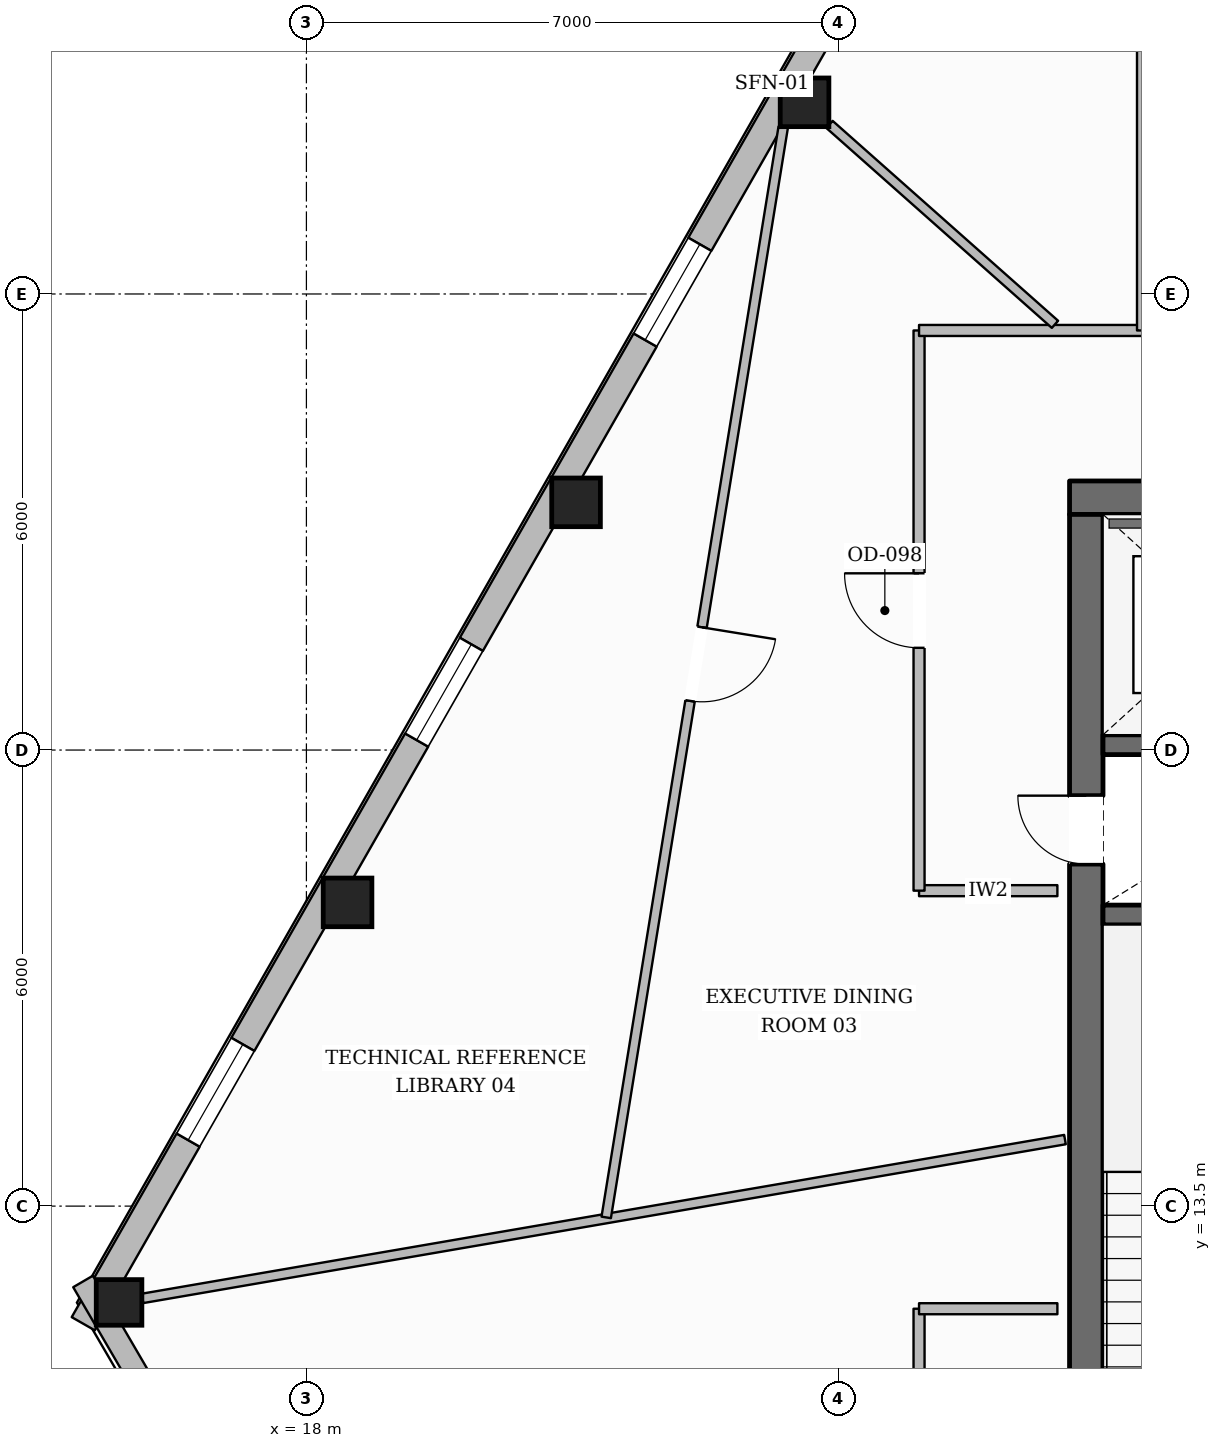
"""IFC4 building model, lengths in metres.
Left out: names, types, materials, properties, quantities, classifications, styles, units other than length and angle.
Written with IfcOpenShell. Run it as: python <this file> out.ifc"""

import sys

from ifc_helpers import new_model, si_unit, direction, frame, frame_2d, origin, origin_2d, place, context, subcontext, project, spatial, rectangle, hollow_rectangle, extrude, element, fill, save


model = new_model("IFC4")
c1 = context("Model", 3, precision=1e-05, world=origin(), true_north=direction((0.0, 1.0)))
c2 = subcontext(c1, "Body", "Model", "MODEL_VIEW")
j1 = project(units=[si_unit("LENGTHUNIT", "METRE"), si_unit("PLANEANGLEUNIT", "RADIAN")], contexts=[c1])
p1 = place(None, origin())
s1 = spatial("IfcSite", under=j1, at=p1, CompositionType="ELEMENT")
p2 = place(p1, origin())
s2 = spatial("IfcBuilding", under=s1, at=p2, CompositionType="ELEMENT")
p3 = place(p2, frame((0.0, 0.0, 184.25)))
s3 = spatial("IfcBuildingStorey", under=s2, at=p3, CompositionType="ELEMENT", Elevation=184.25)
p4 = place(p3, frame((28.04, 22.82, 0.0), z_axis=(0.0, 0.0, 1.0), x_axis=(1.0, 0.0, 0.0)))
e1 = element("IfcWall", 1, at=p4, inside=s3, PredefinedType="SOLIDWALL", context=c2, shape_type="SweptSolid", body=[
    extrude(rectangle(XDim=19.92, YDim=0.44, at=frame_2d((9.96, 0.0))), origin(), (0.0, 0.0, 1.0), 3.6),
])
p5 = place(p4, frame((6.235, 0.0, 0.0)))
e2 = element("IfcOpeningElement", 2, at=p5, cuts=e1, PredefinedType="OPENING", context=c2, shape_type="SweptSolid", body=[
    extrude(rectangle(XDim=1.05, YDim=2.15, at=frame_2d((0.525, 1.075))), frame((0.0, 0.23, 0.0), z_axis=(0.0, -1.0, 0.0), x_axis=(1.0, 0.0, 0.0)), (0.0, 0.0, 1.0), 0.46),
])
p6 = place(p4, frame((12.635, 0.0, 0.0)))
e3 = element("IfcOpeningElement", 3, at=p6, cuts=e1, PredefinedType="OPENING", context=c2, shape_type="SweptSolid", body=[
    extrude(rectangle(XDim=1.05, YDim=2.15, at=frame_2d((0.525, 1.075))), frame((0.0, 0.23, 0.0), z_axis=(0.0, -1.0, 0.0), x_axis=(1.0, 0.0, 0.0)), (0.0, 0.0, 1.0), 0.46),
])
p7 = place(p3, frame((28.26, 9.6, 0.0), z_axis=(0.0, 0.0, 1.0), x_axis=(0.0, 1.0, 0.0)))
e4 = element("IfcWall", 4, at=p7, inside=s3, PredefinedType="SOLIDWALL", context=c2, shape_type="SweptSolid", body=[
    extrude(rectangle(XDim=13.0, YDim=0.44, at=frame_2d((6.5, 0.0))), origin(), (0.0, 0.0, 1.0), 3.6),
])
p8 = place(p7, frame((0.2, 0.0, 0.0)))
e5 = element("IfcOpeningElement", 5, at=p8, cuts=e4, PredefinedType="OPENING", context=c2, shape_type="SweptSolid", body=[
    extrude(rectangle(XDim=1.1, YDim=2.15, at=frame_2d((0.55, 1.075))), frame((0.0, 0.23, 0.0), z_axis=(0.0, -1.0, 0.0), x_axis=(1.0, 0.0, 0.0)), (0.0, 0.0, 1.0), 0.46),
])
p9 = place(p7, frame((8.4, 0.0, 0.0)))
e6 = element("IfcOpeningElement", 6, at=p9, cuts=e4, PredefinedType="OPENING", context=c2, shape_type="SweptSolid", body=[
    extrude(rectangle(XDim=0.9, YDim=2.1, at=frame_2d((0.45, 1.05))), frame((0.0, 0.23, 0.0), z_axis=(0.0, -1.0, 0.0), x_axis=(1.0, 0.0, 0.0)), (0.0, 0.0, 1.0), 0.46),
])
for number, where, z_axis, x_axis in (
    (7, (28.48, 17.33, 0.0), (0.0, 0.0, 1.0), (1.0, 0.0, 0.0)),
    (8, (28.48, 19.57, 0.0), (0.0, 0.0, 1.0), (1.0, 0.0, 0.0)),
):
    element("IfcWall", number, at=place(p3, frame(where, z_axis=z_axis, x_axis=x_axis)), inside=s3, PredefinedType="SHEAR", context=c2, shape_type="SweptSolid", body=[
        extrude(rectangle(XDim=3.2, YDim=0.26, at=frame_2d((1.6, 0.0))), origin(), (0.0, 0.0, 1.0), 3.6),
    ])
for number, where, z_axis, x_axis in (
    (9, (24.554, 28.021, 0.0), (0.0, 0.0, 1.0), (1.0, 0.0, 0.0)),
    (10, (21.548, 22.759, 0.0), (0.0, 0.0, 1.0), (1.0, 0.0, 0.0)),
    (11, (18.542, 17.496, 0.0), (0.0, 0.0, 1.0), (1.0, 0.0, 0.0)),
):
    element("IfcColumn", number, at=place(p3, frame(where, z_axis=z_axis, x_axis=x_axis)), inside=s3, PredefinedType="COLUMN", context=c2, shape_type="SweptSolid", body=[
        extrude(hollow_rectangle(XDim=0.64, YDim=0.64, WallThickness=0.028, at=origin_2d()), origin(), (0.0, 0.0, 1.0), 3.6),
    ])
p10 = place(p3, frame((15.535, 12.233, 0.0), z_axis=(0.0, 0.0, 1.0), x_axis=(1.0, 0.0, 0.0)))
e12 = element("IfcColumn", 12, at=p10, inside=s3, PredefinedType="COLUMN", context=c2, shape_type="SweptSolid", body=[
    extrude(hollow_rectangle(XDim=0.6, YDim=0.6, WallThickness=0.028, at=origin_2d()), origin(), (0.0, 0.0, 1.0), 3.6),
])
p11 = place(p3, frame((15.064, 11.953, 0.0), z_axis=(0.0, 0.0, 1.0), x_axis=(0.495993114815, 0.86832645362, 0.0)))
e13 = element("IfcWall", 13, at=p11, inside=s3, PredefinedType="STANDARD", context=c2, shape_type="SweptSolid", body=[
    extrude(rectangle(XDim=37.324, YDim=0.35, at=frame_2d((18.662, 0.0))), origin(), (0.0, 0.0, 1.0), 3.132),
])
p12 = place(p11, frame((33.087, 0.0, 0.65)))
e14 = element("IfcOpeningElement", 14, at=p12, cuts=e13, PredefinedType="OPENING", context=c2, shape_type="SweptSolid", body=[
    extrude(rectangle(XDim=1.45, YDim=1.75, at=frame_2d((0.725, 0.875))), frame((0.0, 0.185, 0.0), z_axis=(0.0, -1.0, 0.0), x_axis=(1.0, 0.0, 0.0)), (0.0, 0.0, 1.0), 0.37),
])
p13 = place(p11, frame((27.026, 0.0, 0.65)))
e15 = element("IfcOpeningElement", 15, at=p13, cuts=e13, PredefinedType="OPENING", context=c2, shape_type="SweptSolid", body=[
    extrude(rectangle(XDim=1.45, YDim=1.75, at=frame_2d((0.725, 0.875))), frame((0.0, 0.185, 0.0), z_axis=(0.0, -1.0, 0.0), x_axis=(1.0, 0.0, 0.0)), (0.0, 0.0, 1.0), 0.37),
])
p14 = place(p11, frame((14.904, 0.0, 0.65)))
e16 = element("IfcOpeningElement", 16, at=p14, cuts=e13, PredefinedType="OPENING", context=c2, shape_type="SweptSolid", body=[
    extrude(rectangle(XDim=1.45, YDim=1.75, at=frame_2d((0.725, 0.875))), frame((0.0, 0.185, 0.0), z_axis=(0.0, -1.0, 0.0), x_axis=(1.0, 0.0, 0.0)), (0.0, 0.0, 1.0), 0.37),
])
p15 = place(p11, frame((8.844, 0.0, 0.65)))
e17 = element("IfcOpeningElement", 17, at=p15, cuts=e13, PredefinedType="OPENING", context=c2, shape_type="SweptSolid", body=[
    extrude(rectangle(XDim=1.45, YDim=1.75, at=frame_2d((0.725, 0.875))), frame((0.0, 0.185, 0.0), z_axis=(0.0, -1.0, 0.0), x_axis=(1.0, 0.0, 0.0)), (0.0, 0.0, 1.0), 0.37),
])
p16 = place(p11, frame((2.782, 0.0, 0.65)))
e18 = element("IfcOpeningElement", 18, at=p16, cuts=e13, PredefinedType="OPENING", context=c2, shape_type="SweptSolid", body=[
    extrude(rectangle(XDim=1.45, YDim=1.75, at=frame_2d((0.725, 0.875))), frame((0.0, 0.185, 0.0), z_axis=(0.0, -1.0, 0.0), x_axis=(1.0, 0.0, 0.0)), (0.0, 0.0, 1.0), 0.37),
])
p17 = place(p3, frame((20.12, 3.839, 0.0), z_axis=(0.0, 0.0, 1.0), x_axis=(-0.503937564299, 0.863740083178, 0.0)))
e19 = element("IfcWall", 19, at=p17, inside=s3, PredefinedType="STANDARD", context=c2, shape_type="SweptSolid", body=[
    extrude(rectangle(XDim=10.038, YDim=0.3, at=frame_2d((5.019, 0.0))), origin(), (0.0, 0.0, 1.0), 3.132),
])
p18 = place(p17, frame((4.494, 0.0, 0.65)))
e20 = element("IfcOpeningElement", 20, at=p18, cuts=e19, PredefinedType="OPENING", context=c2, shape_type="SweptSolid", body=[
    extrude(rectangle(XDim=1.05, YDim=1.7, at=frame_2d((0.525, 0.85))), frame((0.0, 0.16, 0.0), z_axis=(0.0, -1.0, 0.0), x_axis=(1.0, 0.0, 0.0)), (0.0, 0.0, 1.0), 0.32),
])
p19 = place(p3, frame((27.88, 17.65, 0.0), z_axis=(0.0, 0.0, 1.0), x_axis=(-1.0, 0.0, 0.0)))
e21 = element("IfcWall", 21, at=p19, inside=s3, PredefinedType="PARTITIONING", context=c2, shape_type="SweptSolid", body=[
    extrude(rectangle(XDim=1.82, YDim=0.145, at=frame_2d((0.91, 0.0))), origin(), (0.0, 0.0, 1.0), 3.141),
])
p20 = place(p3, frame((26.06, 17.65, 0.0), z_axis=(0.0, 0.0, 1.0), x_axis=(0.0, 1.0, 0.0)))
e22 = element("IfcWall", 22, at=p20, inside=s3, PredefinedType="PARTITIONING", context=c2, shape_type="SweptSolid", body=[
    extrude(rectangle(XDim=7.37, YDim=0.145, at=frame_2d((3.685, 0.0))), origin(), (0.0, 0.0, 1.0), 3.339),
])
p21 = place(p20, frame((3.195, 0.0, 0.0)))
e23 = element("IfcOpeningElement", 23, at=p21, cuts=e22, PredefinedType="OPENING", context=c2, shape_type="SweptSolid", body=[
    extrude(rectangle(XDim=0.98, YDim=2.15, at=frame_2d((0.49, 1.075))), frame((0.0, 0.083, 0.0), z_axis=(0.0, -1.0, 0.0), x_axis=(1.0, 0.0, 0.0)), (0.0, 0.0, 1.0), 0.165),
])
p22 = place(p3, frame((26.06, 25.02, 0.0), z_axis=(0.0, 0.0, 1.0), x_axis=(1.0, 0.0, 0.0)))
e24 = element("IfcWall", 24, at=p22, inside=s3, PredefinedType="PARTITIONING", context=c2, shape_type="SweptSolid", body=[
    extrude(rectangle(XDim=2.94, YDim=0.145, at=frame_2d((1.47, 0.0))), origin(), (0.0, 0.0, 1.0), 3.6),
])
p23 = place(p3, frame((29.0, 25.02, 0.0), z_axis=(0.0, 0.0, 1.0), x_axis=(0.0, 1.0, 0.0)))
e25 = element("IfcWall", 25, at=p23, inside=s3, PredefinedType="PARTITIONING", context=c2, shape_type="SweptSolid", body=[
    extrude(rectangle(XDim=8.662, YDim=0.145, at=frame_2d((4.331, 0.0))), origin(), (0.0, 0.0, 1.0), 3.6),
])
p24 = place(p3, frame((26.06, 7.18, 0.0), z_axis=(0.0, 0.0, 1.0), x_axis=(0.0, 1.0, 0.0)))
e26 = element("IfcWall", 26, at=p24, inside=s3, PredefinedType="PARTITIONING", context=c2, shape_type="SweptSolid", body=[
    extrude(rectangle(XDim=4.97, YDim=0.145, at=frame_2d((2.485, 0.0))), origin(), (0.0, 0.0, 1.0), 3.6),
])
p25 = place(p24, frame((1.785, 0.0, 0.0)))
e27 = element("IfcOpeningElement", 27, at=p25, cuts=e26, PredefinedType="OPENING", context=c2, shape_type="SweptSolid", body=[
    extrude(rectangle(XDim=1.4, YDim=2.2, at=frame_2d((0.7, 1.1))), frame((0.0, 0.083, 0.0), z_axis=(0.0, -1.0, 0.0), x_axis=(1.0, 0.0, 0.0)), (0.0, 0.0, 1.0), 0.165),
])
p26 = place(p3, frame((26.06, 12.15, 0.0), z_axis=(0.0, 0.0, 1.0), x_axis=(1.0, 0.0, 0.0)))
e28 = element("IfcWall", 28, at=p26, inside=s3, PredefinedType="PARTITIONING", context=c2, shape_type="SweptSolid", body=[
    extrude(rectangle(XDim=1.82, YDim=0.145, at=frame_2d((0.91, 0.0))), origin(), (0.0, 0.0, 1.0), 3.141),
])
p27 = place(p3, frame((27.848, 25.101, 0.0), z_axis=(0.0, 0.0, 1.0), x_axis=(-0.748288582972, 0.66337334631, 0.0)))
e29 = element("IfcWall", 29, at=p27, inside=s3, PredefinedType="PARTITIONING", context=c2, shape_type="SweptSolid", body=[
    extrude(rectangle(XDim=3.965, YDim=0.125, at=frame_2d((1.982, 0.0))), origin(), (0.0, 0.0, 1.0), 3.141),
])
p28 = place(p3, frame((27.98, 14.375, 0.0), z_axis=(0.0, 0.0, 1.0), x_axis=(-0.9855033492, -0.169655971646, 0.0)))
e30 = element("IfcWall", 30, at=p28, inside=s3, PredefinedType="PARTITIONING", context=c2, shape_type="SweptSolid", body=[
    extrude(rectangle(XDim=12.315, YDim=0.125, at=frame_2d((6.158, 0.0))), origin(), (0.0, 0.0, 1.0), 3.141),
])
p29 = place(p3, frame((24.273, 27.694, 0.0), z_axis=(0.0, 0.0, 1.0), x_axis=(-0.160245052552, -0.987077263, 0.0)))
e31 = element("IfcWall", 31, at=p29, inside=s3, PredefinedType="PARTITIONING", context=c2, shape_type="SweptSolid", body=[
    extrude(rectangle(XDim=14.53, YDim=0.125, at=frame_2d((7.265, 0.0))), origin(), (0.0, 0.0, 1.0), 3.135),
])
p30 = place(p29, frame((6.665, 0.0, 0.0)))
e32 = element("IfcOpeningElement", 32, at=p30, cuts=e31, PredefinedType="OPENING", context=c2, shape_type="SweptSolid", body=[
    extrude(rectangle(XDim=0.98, YDim=2.15, at=frame_2d((0.49, 1.075))), frame((0.0, 0.073, 0.0), z_axis=(0.0, -1.0, 0.0), x_axis=(1.0, 0.0, 0.0)), (0.0, 0.0, 1.0), 0.145),
])
p31 = place(p14, origin())
e33 = element("IfcWindow", 33, at=p31, inside=s3, PartitioningType="SINGLE_PANEL", PredefinedType="WINDOW", context=c2, shape_type="SweptSolid", body=[
    extrude(rectangle(XDim=1.45, YDim=1.75, at=frame_2d((0.725, 0.875))), frame((0.0, 0.03, 0.0), z_axis=(0.0, -1.0, 0.0), x_axis=(1.0, 0.0, 0.0)), (0.0, 0.0, 1.0), 0.06),
])
fill(e16, e33)
p32 = place(p15, origin())
e34 = element("IfcWindow", 34, at=p32, inside=s3, PartitioningType="SINGLE_PANEL", PredefinedType="WINDOW", context=c2, shape_type="SweptSolid", body=[
    extrude(rectangle(XDim=1.45, YDim=1.75, at=frame_2d((0.725, 0.875))), frame((0.0, 0.03, 0.0), z_axis=(0.0, -1.0, 0.0), x_axis=(1.0, 0.0, 0.0)), (0.0, 0.0, 1.0), 0.06),
])
fill(e17, e34)
p33 = place(p16, origin())
e35 = element("IfcWindow", 35, at=p33, inside=s3, PartitioningType="SINGLE_PANEL", PredefinedType="WINDOW", context=c2, shape_type="SweptSolid", body=[
    extrude(rectangle(XDim=1.45, YDim=1.75, at=frame_2d((0.725, 0.875))), frame((0.0, 0.03, 0.0), z_axis=(0.0, -1.0, 0.0), x_axis=(1.0, 0.0, 0.0)), (0.0, 0.0, 1.0), 0.06),
])
fill(e18, e35)
p34 = place(p9, origin())
e36 = element("IfcDoor", 36, at=p34, inside=s3, OperationType="SINGLE_SWING_RIGHT", PredefinedType="DOOR", context=c2, shape_type="SweptSolid", body=[
    extrude(rectangle(XDim=0.9, YDim=2.1, at=frame_2d((0.45, 1.05))), frame((0.0, 0.025, 0.0), z_axis=(0.0, -1.0, 0.0), x_axis=(1.0, 0.0, 0.0)), (0.0, 0.0, 1.0), 0.05),
])
fill(e6, e36)
p35 = place(p21, origin())
e37 = element("IfcDoor", 37, at=p35, inside=s3, OperationType="SINGLE_SWING_RIGHT", PredefinedType="DOOR", context=c2, shape_type="SweptSolid", body=[
    extrude(rectangle(XDim=0.98, YDim=2.15, at=frame_2d((0.49, 1.075))), frame((0.0, 0.025, 0.0), z_axis=(0.0, -1.0, 0.0), x_axis=(1.0, 0.0, 0.0)), (0.0, 0.0, 1.0), 0.05),
])
fill(e23, e37)
p36 = place(p30, origin())
e38 = element("IfcDoor", 38, at=p36, inside=s3, OperationType="SINGLE_SWING_LEFT", PredefinedType="DOOR", context=c2, shape_type="SweptSolid", body=[
    extrude(rectangle(XDim=0.98, YDim=2.15, at=frame_2d((0.49, 1.075))), frame((0.0, 0.025, 0.0), z_axis=(0.0, -1.0, 0.0), x_axis=(1.0, 0.0, 0.0)), (0.0, 0.0, 1.0), 0.05),
])
fill(e32, e38)
save(model, sys.argv[1])
